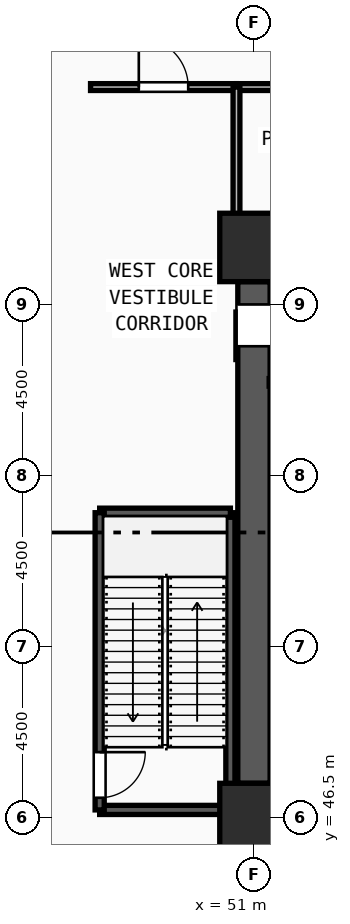
"""IFC4 building model, lengths in metres.
Left out: names, types, materials, properties, quantities, classifications, styles, units other than length and angle.
Written with IfcOpenShell. Run it as: python <this file> out.ifc"""

import sys

from ifc_helpers import new_model, si_unit, direction, frame, frame_2d, origin, origin_2d, place, context, subcontext, project, spatial, rectangle, extrude, source, transform, mapped, element, fill, save


model = new_model("IFC4")
c1 = context("Model", 3, precision=1e-05, world=origin(), true_north=direction((0.0, 1.0)))
c2 = subcontext(c1, "Body", "Model", "MODEL_VIEW")
j1 = project(units=[si_unit("LENGTHUNIT", "METRE"), si_unit("PLANEANGLEUNIT", "RADIAN")], contexts=[c1])
p1 = place(None, origin())
s1 = spatial("IfcSite", under=j1, at=p1, CompositionType="ELEMENT")
p2 = place(p1, origin())
s2 = spatial("IfcBuilding", under=s1, at=p2, CompositionType="ELEMENT")
p3 = place(p2, origin())
s3 = spatial("IfcBuildingStorey", under=s2, at=p3, CompositionType="ELEMENT", Elevation=0.0)
m1 = source(origin(), c2, "Body", "SweptSolid", [
    extrude(rectangle(XDim=1.8, YDim=1.8, at=origin_2d()), origin(), (0.0, 0.0, 1.0), 5.4),
])
for number, where, z_axis, x_axis in (
    (1, (51.0, 46.5, 0.0), (0.0, 0.0, 1.0), (1.0, 0.0, 0.0)),
    (2, (51.0, 61.5, 0.0), (0.0, 0.0, 1.0), (1.0, 0.0, 0.0)),
):
    element("IfcColumn", number, at=place(p3, frame(where, z_axis=z_axis, x_axis=x_axis)), inside=s3, PredefinedType="COLUMN", context=c2, shape_type="MappedRepresentation", body=[
        mapped(m1, transform((0.0, 0.0, 0.0), x_axis=(1.0, 0.0, 0.0), y_axis=(0.0, 1.0, 0.0), z_axis=(0.0, 0.0, 1.0), scale=1.0)),
    ])
p4 = place(p3, frame((51.0, 47.4, 0.0), z_axis=(0.0, 0.0, 1.0), x_axis=(0.0, 1.0, 0.0)))
e3 = element("IfcWall", 3, at=p4, inside=s3, PredefinedType="SHEAR", context=c2, shape_type="SweptSolid", body=[
    extrude(rectangle(XDim=13.2, YDim=0.85, at=frame_2d((6.6, 0.0))), origin(), (0.0, 0.0, 1.0), 5.15),
])
m2 = source(origin(), c2, "Body", "SweptSolid", [
    extrude(rectangle(XDim=1.1, YDim=2.2, at=frame_2d((0.55, 1.1))), frame((0.0, 0.435, 0.0), z_axis=(0.0, -1.0, 0.0), x_axis=(1.0, 0.0, 0.0)), (0.0, 0.0, 1.0), 0.87),
])
p5 = place(p4, frame((11.5, 0.0, 0.0)))
e4 = element("IfcOpeningElement", 4, at=p5, cuts=e3, PredefinedType="OPENING", context=c2, shape_type="MappedRepresentation", body=[
    mapped(m2, transform((0.0, 0.0, 0.0), x_axis=(1.0, 0.0, 0.0), y_axis=(0.0, 1.0, 0.0), z_axis=(0.0, 0.0, 1.0), scale=1.0)),
])
p6 = place(p3, frame((46.94, 46.7, 0.0), z_axis=(0.0, 0.0, 1.0), x_axis=(1.0, 0.0, 0.0)))
e5 = element("IfcWall", 5, at=p6, inside=s3, PredefinedType="SOLIDWALL", context=c2, shape_type="SweptSolid", body=[
    extrude(rectangle(XDim=3.44, YDim=0.24, at=frame_2d((1.72, 0.0))), origin(), (0.0, 0.0, 1.0), 5.15),
])
p7 = place(p3, frame((50.38, 46.7, 0.0), z_axis=(0.0, 0.0, 1.0), x_axis=(0.0, 1.0, 0.0)))
e6 = element("IfcWall", 6, at=p7, inside=s3, PredefinedType="SOLIDWALL", context=c2, shape_type="SweptSolid", body=[
    extrude(rectangle(XDim=7.82, YDim=0.24, at=frame_2d((3.91, 0.0))), origin(), (0.0, 0.0, 1.0), 5.15),
])
p8 = place(p3, frame((50.38, 54.52, 0.0), z_axis=(0.0, 0.0, 1.0), x_axis=(-1.0, 0.0, 0.0)))
e7 = element("IfcWall", 7, at=p8, inside=s3, PredefinedType="SOLIDWALL", context=c2, shape_type="SweptSolid", body=[
    extrude(rectangle(XDim=3.44, YDim=0.24, at=frame_2d((1.72, 0.0))), origin(), (0.0, 0.0, 1.0), 5.15),
])
p9 = place(p3, frame((46.94, 54.52, 0.0), z_axis=(0.0, 0.0, 1.0), x_axis=(0.0, -1.0, 0.0)))
e8 = element("IfcWall", 8, at=p9, inside=s3, PredefinedType="SOLIDWALL", context=c2, shape_type="SweptSolid", body=[
    extrude(rectangle(XDim=7.82, YDim=0.24, at=frame_2d((3.91, 0.0))), origin(), (0.0, 0.0, 1.0), 5.15),
])
m3 = source(origin(), c2, "Body", "SweptSolid", [
    extrude(rectangle(XDim=1.2, YDim=2.2, at=frame_2d((0.6, 1.1))), frame((0.0, 0.13, 0.0), z_axis=(0.0, -1.0, 0.0), x_axis=(1.0, 0.0, 0.0)), (0.0, 0.0, 1.0), 0.26),
])
p10 = place(p9, frame((6.3, 0.0, 0.0)))
e9 = element("IfcOpeningElement", 9, at=p10, cuts=e8, PredefinedType="OPENING", context=c2, shape_type="MappedRepresentation", body=[
    mapped(m3, transform((0.0, 0.0, 0.0), x_axis=(1.0, 0.0, 0.0), y_axis=(0.0, 1.0, 0.0), z_axis=(0.0, 0.0, 1.0), scale=1.0)),
])
for number, where, z_axis, x_axis in (
    (10, (51.4, 57.95, 0.0), (0.0, 0.0, 1.0), (1.0, 0.0, 0.0)),
    (11, (53.8, 60.88, 0.0), (0.0, 0.0, 1.0), (-1.0, 0.0, 0.0)),
):
    element("IfcWall", number, at=place(p3, frame(where, z_axis=z_axis, x_axis=x_axis)), inside=s3, PredefinedType="SOLIDWALL", context=c2, shape_type="SweptSolid", body=[
        extrude(rectangle(XDim=2.4, YDim=0.2, at=frame_2d((1.2, 0.0))), origin(), (0.0, 0.0, 1.0), 5.15),
    ])
p11 = place(p3, frame((50.54, 65.72, 0.0), z_axis=(0.0, 0.0, 1.0), x_axis=(1.0, 0.0, 0.0)))
e12 = element("IfcWall", 12, at=p11, inside=s3, PredefinedType="PARTITIONING", context=c2, shape_type="SweptSolid", body=[
    extrude(rectangle(XDim=3.87, YDim=0.18, at=frame_2d((1.935, 0.0))), origin(), (0.0, 0.0, 1.0), 5.15),
])
m4 = source(origin(), c2, "Body", "SweptSolid", [
    extrude(rectangle(XDim=1.0, YDim=2.2, at=frame_2d((0.5, 1.1))), frame((0.0, 0.1, 0.0), z_axis=(0.0, -1.0, 0.0), x_axis=(1.0, 0.0, 0.0)), (0.0, 0.0, 1.0), 0.2),
])
p12 = place(p11, frame((1.435, 0.0, 0.0)))
e13 = element("IfcOpeningElement", 13, at=p12, cuts=e12, PredefinedType="OPENING", context=c2, shape_type="MappedRepresentation", body=[
    mapped(m4, transform((0.0, 0.0, 0.0), x_axis=(1.0, 0.0, 0.0), y_axis=(0.0, 1.0, 0.0), z_axis=(0.0, 0.0, 1.0), scale=1.0)),
])
p13 = place(p3, frame((46.7, 65.72, 0.0), z_axis=(0.0, 0.0, 1.0), x_axis=(1.0, 0.0, 0.0)))
e14 = element("IfcWall", 14, at=p13, inside=s3, PredefinedType="PARTITIONING", context=c2, shape_type="SweptSolid", body=[
    extrude(rectangle(XDim=3.84, YDim=0.18, at=frame_2d((1.92, 0.0))), origin(), (0.0, 0.0, 1.0), 5.15),
])
m5 = source(origin(), c2, "Body", "SweptSolid", [
    extrude(rectangle(XDim=1.3, YDim=2.2, at=frame_2d((0.65, 1.1))), frame((0.0, 0.1, 0.0), z_axis=(0.0, -1.0, 0.0), x_axis=(1.0, 0.0, 0.0)), (0.0, 0.0, 1.0), 0.2),
])
p14 = place(p13, frame((1.27, 0.0, 0.0)))
e15 = element("IfcOpeningElement", 15, at=p14, cuts=e14, PredefinedType="OPENING", context=c2, shape_type="MappedRepresentation", body=[
    mapped(m5, transform((0.0, 0.0, 0.0), x_axis=(1.0, 0.0, 0.0), y_axis=(0.0, 1.0, 0.0), z_axis=(0.0, 0.0, 1.0), scale=1.0)),
])
p15 = place(p3, frame((50.54, 61.95, 0.0), z_axis=(0.0, 0.0, 1.0), x_axis=(0.0, 1.0, 0.0)))
e16 = element("IfcWall", 16, at=p15, inside=s3, PredefinedType="PARTITIONING", context=c2, shape_type="SweptSolid", body=[
    extrude(rectangle(XDim=3.77, YDim=0.18, at=frame_2d((1.885, 0.0))), origin(), (0.0, 0.0, 1.0), 5.15),
])
m6 = source(origin(), c2, "Body", "SweptSolid", [
    extrude(rectangle(XDim=1.2, YDim=2.2, at=frame_2d((0.6, 1.1))), frame((0.0, 0.025, 0.0), z_axis=(0.0, -1.0, 0.0), x_axis=(1.0, 0.0, 0.0)), (0.0, 0.0, 1.0), 0.05),
])
p16 = place(p10, origin())
e17 = element("IfcDoor", 17, at=p16, inside=s3, OperationType="SINGLE_SWING_LEFT", PredefinedType="DOOR", context=c2, shape_type="MappedRepresentation", body=[
    mapped(m6, transform((0.0, 0.0, 0.0), x_axis=(1.0, 0.0, 0.0), y_axis=(0.0, 1.0, 0.0), z_axis=(0.0, 0.0, 1.0), scale=1.0)),
])
fill(e9, e17)
m7 = source(origin(), c2, "Body", "SweptSolid", [
    extrude(rectangle(XDim=1.1, YDim=2.2, at=frame_2d((0.55, 1.1))), frame((0.0, 0.025, 0.0), z_axis=(0.0, -1.0, 0.0), x_axis=(1.0, 0.0, 0.0)), (0.0, 0.0, 1.0), 0.05),
])
p17 = place(p5, origin())
e18 = element("IfcDoor", 18, at=p17, inside=s3, OperationType="SLIDING_TO_LEFT", PredefinedType="DOOR", context=c2, shape_type="MappedRepresentation", body=[
    mapped(m7, transform((0.0, 0.0, 0.0), x_axis=(1.0, 0.0, 0.0), y_axis=(0.0, 1.0, 0.0), z_axis=(0.0, 0.0, 1.0), scale=1.0)),
])
fill(e4, e18)
m8 = source(origin(), c2, "Body", "SweptSolid", [
    extrude(rectangle(XDim=1.3, YDim=2.2, at=frame_2d((0.65, 1.1))), frame((0.0, 0.025, 0.0), z_axis=(0.0, -1.0, 0.0), x_axis=(1.0, 0.0, 0.0)), (0.0, 0.0, 1.0), 0.05),
])
p18 = place(p14, origin())
e19 = element("IfcDoor", 19, at=p18, inside=s3, OperationType="SINGLE_SWING_LEFT", PredefinedType="DOOR", context=c2, shape_type="MappedRepresentation", body=[
    mapped(m8, transform((0.0, 0.0, 0.0), x_axis=(1.0, 0.0, 0.0), y_axis=(0.0, 1.0, 0.0), z_axis=(0.0, 0.0, 1.0), scale=1.0)),
])
fill(e15, e19)
save(model, sys.argv[1])
